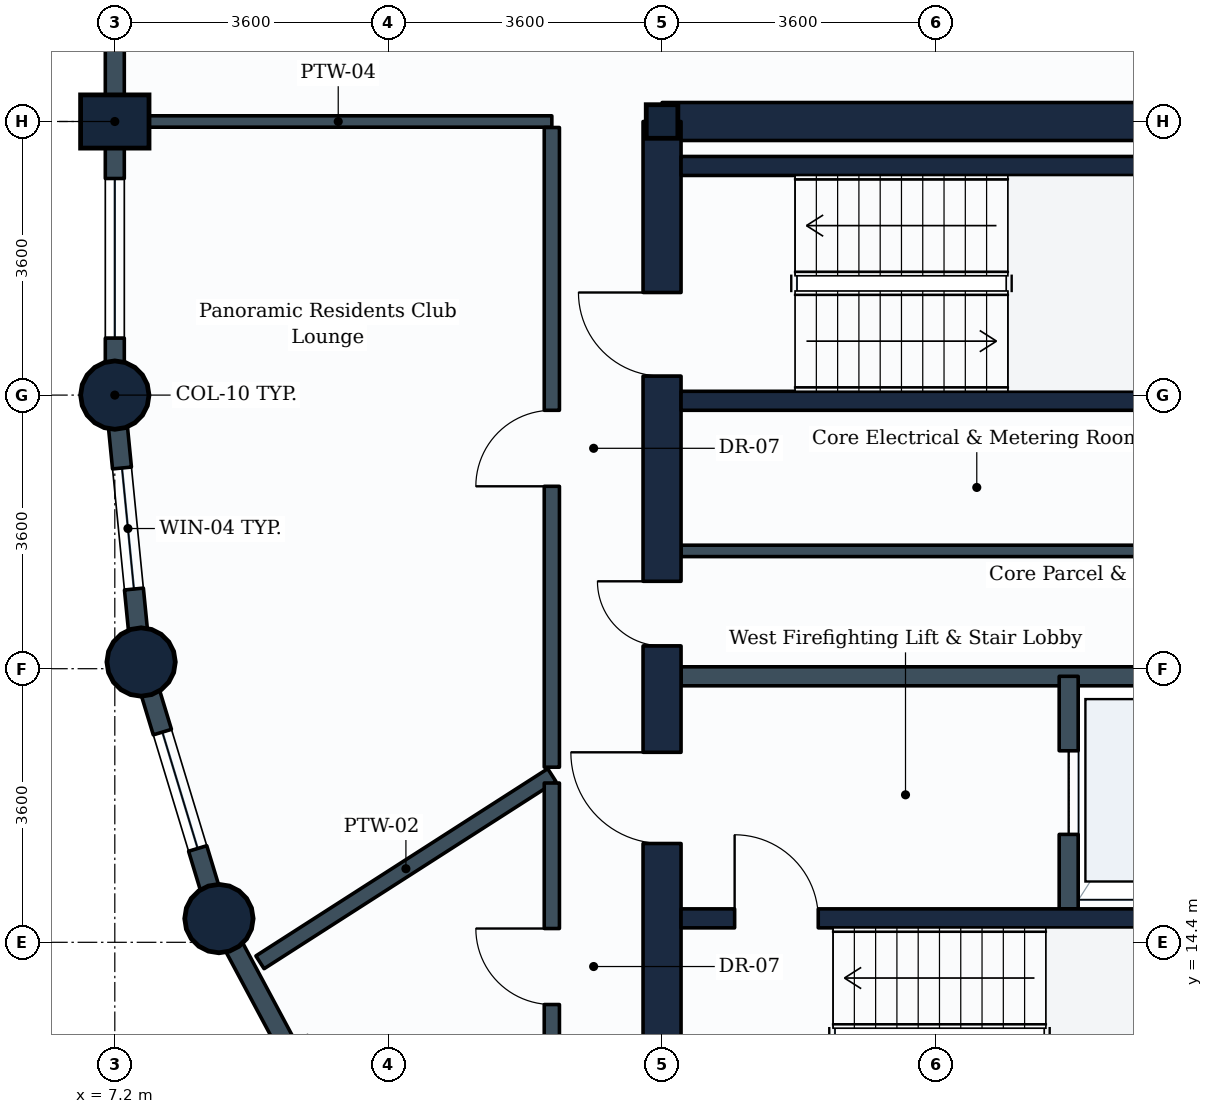
"""IFC4 building model, lengths in metres.
Left out: names, types, materials, properties, quantities, classifications, styles, units other than length and angle.
Written with IfcOpenShell. Run it as: python <this file> out.ifc"""

import sys

from ifc_helpers import new_model, si_unit, direction, frame, frame_2d, origin, origin_2d, place, context, subcontext, project, spatial, rectangle, circle, i_section, extrude, element, fill, save


model = new_model("IFC4")
c1 = context("Model", 3, precision=1e-05, world=origin(), true_north=direction((0.0, 1.0)))
c2 = subcontext(c1, "Body", "Model", "MODEL_VIEW")
j1 = project(units=[si_unit("LENGTHUNIT", "METRE"), si_unit("PLANEANGLEUNIT", "RADIAN")], contexts=[c1])
p1 = place(None, origin())
s1 = spatial("IfcSite", under=j1, at=p1, CompositionType="ELEMENT")
p2 = place(p1, origin())
s2 = spatial("IfcBuilding", under=s1, at=p2, CompositionType="ELEMENT")
p3 = place(p2, frame((0.0, 0.0, 186.2)))
s3 = spatial("IfcBuildingStorey", under=s2, at=p3, CompositionType="ELEMENT", Elevation=186.2)
p4 = place(p3, frame((7.2, 21.6, 0.0), z_axis=(0.0, 0.0, 1.0), x_axis=(1.0, 0.0, 0.0)))
e1 = element("IfcColumn", 1, at=p4, inside=s3, PredefinedType="COLUMN", context=c2, shape_type="SweptSolid", body=[
    extrude(circle(Radius=0.45, at=origin_2d()), origin(), (0.0, 0.0, 1.0), 3.8),
])
p5 = place(p3, frame((7.2, 25.2, 0.0), z_axis=(0.0, 0.0, 1.0), x_axis=(0.0, 1.0, 0.0)))
e2 = element("IfcColumn", 2, at=p5, inside=s3, PredefinedType="COLUMN", context=c2, shape_type="SweptSolid", body=[
    extrude(rectangle(XDim=0.7, YDim=0.9, at=origin_2d()), origin(), (0.0, 0.0, 1.0), 3.8),
])
for number, where, z_axis, x_axis in (
    (3, (7.546, 18.088, 0.0), (0.0, 0.0, 1.0), (1.0, 0.0, 0.0)),
    (4, (8.57, 14.712, 0.0), (0.0, 0.0, 1.0), (1.0, 0.0, 0.0)),
):
    element("IfcColumn", number, at=place(p3, frame(where, z_axis=z_axis, x_axis=x_axis)), inside=s3, PredefinedType="COLUMN", context=c2, shape_type="SweptSolid", body=[
        extrude(circle(Radius=0.45, at=origin_2d()), origin(), (0.0, 0.0, 1.0), 3.8),
    ])
p6 = place(p3, frame((14.4, 25.2, 0.0), z_axis=(0.0, 0.0, 1.0), x_axis=(1.0, 0.0, 0.0)))
e5 = element("IfcColumn", 5, at=p6, inside=s3, PredefinedType="COLUMN", context=c2, shape_type="SweptSolid", body=[
    extrude(i_section(OverallWidth=0.416, OverallDepth=0.442, WebThickness=0.025, FlangeThickness=0.041, FilletRadius=0.015, at=origin_2d()), origin(), (0.0, 0.0, 1.0), 3.8),
])
p7 = place(p3, frame((7.2, 25.2, 0.0), z_axis=(0.0, 0.0, 1.0), x_axis=(0.0, 1.0, 0.0)))
e6 = element("IfcWall", 6, at=p7, inside=s3, PredefinedType="STANDARD", context=c2, shape_type="SweptSolid", body=[
    extrude(rectangle(XDim=3.6, YDim=0.25, at=frame_2d((1.8, 0.0))), origin(), (0.0, 0.0, 1.0), 2.93),
])
p8 = place(p3, frame((7.2, 21.6, 0.0), z_axis=(0.0, 0.0, 1.0), x_axis=(0.0, 1.0, 0.0)))
e7 = element("IfcWall", 7, at=p8, inside=s3, PredefinedType="STANDARD", context=c2, shape_type="SweptSolid", body=[
    extrude(rectangle(XDim=3.6, YDim=0.25, at=frame_2d((1.8, 0.0))), origin(), (0.0, 0.0, 1.0), 2.93),
])
p9 = place(p8, frame((0.75, 0.0, 0.85)))
e8 = element("IfcOpeningElement", 8, at=p9, cuts=e7, PredefinedType="OPENING", context=c2, shape_type="SweptSolid", body=[
    extrude(rectangle(XDim=2.1, YDim=1.35, at=frame_2d((1.05, 0.675))), frame((0.0, 0.135, 0.0), z_axis=(0.0, -1.0, 0.0), x_axis=(1.0, 0.0, 0.0)), (0.0, 0.0, 1.0), 0.27),
])
p10 = place(p3, frame((7.546, 18.088, 0.0), z_axis=(0.0, 0.0, 1.0), x_axis=(-0.09802417461, 0.995184033831, 0.0)))
e9 = element("IfcWall", 9, at=p10, inside=s3, PredefinedType="STANDARD", context=c2, shape_type="SweptSolid", body=[
    extrude(rectangle(XDim=3.529, YDim=0.25, at=frame_2d((1.765, 0.0))), origin(), (0.0, 0.0, 1.0), 2.93),
])
p11 = place(p10, frame((0.965, 0.0, 0.85)))
e10 = element("IfcOpeningElement", 10, at=p11, cuts=e9, PredefinedType="OPENING", context=c2, shape_type="SweptSolid", body=[
    extrude(rectangle(XDim=1.6, YDim=1.35, at=frame_2d((0.8, 0.675))), frame((0.0, 0.135, 0.0), z_axis=(0.0, -1.0, 0.0), x_axis=(1.0, 0.0, 0.0)), (0.0, 0.0, 1.0), 0.27),
])
p12 = place(p3, frame((8.57, 14.712, 0.0), z_axis=(0.0, 0.0, 1.0), x_axis=(-0.290305086481, 0.956934144423, 0.0)))
e11 = element("IfcWall", 11, at=p12, inside=s3, PredefinedType="STANDARD", context=c2, shape_type="SweptSolid", body=[
    extrude(rectangle(XDim=3.528, YDim=0.25, at=frame_2d((1.764, 0.0))), origin(), (0.0, 0.0, 1.0), 2.93),
])
p13 = place(p12, frame((0.964, 0.0, 0.85)))
e12 = element("IfcOpeningElement", 12, at=p13, cuts=e11, PredefinedType="OPENING", context=c2, shape_type="SweptSolid", body=[
    extrude(rectangle(XDim=1.6, YDim=1.35, at=frame_2d((0.8, 0.675))), frame((0.0, 0.135, 0.0), z_axis=(0.0, -1.0, 0.0), x_axis=(1.0, 0.0, 0.0)), (0.0, 0.0, 1.0), 0.27),
])
p14 = place(p3, frame((10.234, 11.6, 0.0), z_axis=(0.0, 0.0, 1.0), x_axis=(-0.47151087309, 0.881860247748, 0.0)))
e13 = element("IfcWall", 13, at=p14, inside=s3, PredefinedType="STANDARD", context=c2, shape_type="SweptSolid", body=[
    extrude(rectangle(XDim=3.529, YDim=0.25, at=frame_2d((1.764, 0.0))), origin(), (0.0, 0.0, 1.0), 2.93),
])
p15 = place(p3, frame((14.4, 25.2, 0.0), z_axis=(0.0, 0.0, 1.0), x_axis=(1.0, 0.0, 0.0)))
e14 = element("IfcWall", 14, at=p15, inside=s3, PredefinedType="SHEAR", context=c2, shape_type="SweptSolid", body=[
    extrude(rectangle(XDim=10.8, YDim=0.5, at=frame_2d((5.4, 0.0))), origin(), (0.0, 0.0, 1.0), 3.55),
])
p16 = place(p3, frame((14.4, 10.8, 0.0), z_axis=(0.0, 0.0, 1.0), x_axis=(0.0, 1.0, 0.0)))
e15 = element("IfcWall", 15, at=p16, inside=s3, PredefinedType="SHEAR", context=c2, shape_type="SweptSolid", body=[
    extrude(rectangle(XDim=14.4, YDim=0.5, at=frame_2d((7.2, 0.0))), origin(), (0.0, 0.0, 1.0), 3.55),
])
p17 = place(p16, frame((11.05, 0.0, 0.0)))
e16 = element("IfcOpeningElement", 16, at=p17, cuts=e15, PredefinedType="OPENING", context=c2, shape_type="SweptSolid", body=[
    extrude(rectangle(XDim=1.1, YDim=2.1, at=frame_2d((0.55, 1.05))), frame((0.0, 0.26, 0.0), z_axis=(0.0, -1.0, 0.0), x_axis=(1.0, 0.0, 0.0)), (0.0, 0.0, 1.0), 0.52),
])
p18 = place(p16, frame((4.9, 0.0, 0.0)))
e17 = element("IfcOpeningElement", 17, at=p18, cuts=e15, PredefinedType="OPENING", context=c2, shape_type="SweptSolid", body=[
    extrude(rectangle(XDim=1.2, YDim=2.1, at=frame_2d((0.6, 1.05))), frame((0.0, 0.26, 0.0), z_axis=(0.0, -1.0, 0.0), x_axis=(1.0, 0.0, 0.0)), (0.0, 0.0, 1.0), 0.52),
])
p19 = place(p16, frame((7.5, 0.0, 0.0)))
e18 = element("IfcOpeningElement", 18, at=p19, cuts=e15, PredefinedType="OPENING", context=c2, shape_type="SweptSolid", body=[
    extrude(rectangle(XDim=0.85, YDim=2.1, at=frame_2d((0.425, 1.05))), frame((0.0, 0.26, 0.0), z_axis=(0.0, -1.0, 0.0), x_axis=(1.0, 0.0, 0.0)), (0.0, 0.0, 1.0), 0.52),
])
p20 = place(p3, frame((14.65, 14.715, 0.0), z_axis=(0.0, 0.0, 1.0), x_axis=(1.0, 0.0, 0.0)))
e19 = element("IfcWall", 19, at=p20, inside=s3, PredefinedType="SHEAR", context=c2, shape_type="SweptSolid", body=[
    extrude(rectangle(XDim=8.7, YDim=0.25, at=frame_2d((4.35, 0.0))), origin(), (0.0, 0.0, 1.0), 3.55),
])
p21 = place(p20, frame((0.705, 0.0, 0.0)))
e20 = element("IfcOpeningElement", 20, at=p21, cuts=e19, PredefinedType="OPENING", context=c2, shape_type="SweptSolid", body=[
    extrude(rectangle(XDim=1.1, YDim=2.1, at=frame_2d((0.55, 1.05))), frame((0.0, 0.135, 0.0), z_axis=(0.0, -1.0, 0.0), x_axis=(1.0, 0.0, 0.0)), (0.0, 0.0, 1.0), 0.27),
])
for number, where, z_axis, x_axis in (
    (21, (14.65, 21.525, 0.0), (0.0, 0.0, 1.0), (1.0, 0.0, 0.0)),
    (22, (14.65, 24.615, 0.0), (0.0, 0.0, 1.0), (1.0, 0.0, 0.0)),
):
    element("IfcWall", number, at=place(p3, frame(where, z_axis=z_axis, x_axis=x_axis)), inside=s3, PredefinedType="SHEAR", context=c2, shape_type="SweptSolid", body=[
        extrude(rectangle(XDim=8.25, YDim=0.25, at=frame_2d((4.125, 0.0))), origin(), (0.0, 0.0, 1.0), 3.55),
    ])
p22 = place(p3, frame((14.65, 17.9, 0.0), z_axis=(0.0, 0.0, 1.0), x_axis=(1.0, 0.0, 0.0)))
e23 = element("IfcWall", 23, at=p22, inside=s3, PredefinedType="PARTITIONING", context=c2, shape_type="SweptSolid", body=[
    extrude(rectangle(XDim=7.15, YDim=0.25, at=frame_2d((3.575, 0.0))), origin(), (0.0, 0.0, 1.0), 3.535),
])
p23 = place(p3, frame((19.75, 14.84, 0.0), z_axis=(0.0, 0.0, 1.0), x_axis=(0.0, 1.0, 0.0)))
e24 = element("IfcWall", 24, at=p23, inside=s3, PredefinedType="PARTITIONING", context=c2, shape_type="SweptSolid", body=[
    extrude(rectangle(XDim=3.06, YDim=0.25, at=frame_2d((1.53, 0.0))), origin(), (0.0, 0.0, 1.0), 3.535),
])
p24 = place(p23, frame((0.98, 0.0, 0.0)))
e25 = element("IfcOpeningElement", 25, at=p24, cuts=e24, PredefinedType="OPENING", context=c2, shape_type="SweptSolid", body=[
    extrude(rectangle(XDim=1.1, YDim=2.1, at=frame_2d((0.55, 1.05))), frame((0.0, 0.135, 0.0), z_axis=(0.0, -1.0, 0.0), x_axis=(1.0, 0.0, 0.0)), (0.0, 0.0, 1.0), 0.27),
])
p25 = place(p3, frame((14.65, 19.55, 0.0), z_axis=(0.0, 0.0, 1.0), x_axis=(1.0, 0.0, 0.0)))
e26 = element("IfcWall", 26, at=p25, inside=s3, PredefinedType="PARTITIONING", context=c2, shape_type="SweptSolid", body=[
    extrude(rectangle(XDim=8.0, YDim=0.15, at=frame_2d((4.0, 0.0))), origin(), (0.0, 0.0, 1.0), 3.535),
])
p26 = place(p3, frame((7.329, 25.2, 0.0), z_axis=(0.0, 0.0, 1.0), x_axis=(1.0, 0.0, 0.0)))
e27 = element("IfcWall", 27, at=p26, inside=s3, PredefinedType="PARTITIONING", context=c2, shape_type="SweptSolid", body=[
    extrude(rectangle(XDim=5.621, YDim=0.15, at=frame_2d((2.811, 0.0))), origin(), (0.0, 0.0, 1.0), 3.535),
])
p27 = place(p3, frame((12.95, 16.6, 0.0), z_axis=(0.0, 0.0, 1.0), x_axis=(-0.841685822078, -0.539967570242, 0.0)))
e28 = element("IfcWall", 28, at=p27, inside=s3, PredefinedType="PARTITIONING", context=c2, shape_type="SweptSolid", body=[
    extrude(rectangle(XDim=4.562, YDim=0.2, at=frame_2d((2.281, 0.0))), origin(), (0.0, 0.0, 1.0), 2.93),
])
p28 = place(p3, frame((12.95, 16.704, 0.0), z_axis=(0.0, 0.0, 1.0), x_axis=(0.0, 1.0, 0.0)))
e29 = element("IfcWall", 29, at=p28, inside=s3, PredefinedType="PARTITIONING", context=c2, shape_type="SweptSolid", body=[
    extrude(rectangle(XDim=8.417, YDim=0.2, at=frame_2d((4.208, 0.0))), origin(), (0.0, 0.0, 1.0), 3.22),
])
p29 = place(p28, frame((3.696, 0.0, 0.0)))
e30 = element("IfcOpeningElement", 30, at=p29, cuts=e29, PredefinedType="OPENING", context=c2, shape_type="SweptSolid", body=[
    extrude(rectangle(XDim=1.0, YDim=2.1, at=frame_2d((0.5, 1.05))), frame((0.0, 0.11, 0.0), z_axis=(0.0, -1.0, 0.0), x_axis=(1.0, 0.0, 0.0)), (0.0, 0.0, 1.0), 0.22),
])
p30 = place(p3, frame((12.95, 9.623, 0.0), z_axis=(0.0, 0.0, 1.0), x_axis=(0.0, 1.0, 0.0)))
e31 = element("IfcWall", 31, at=p30, inside=s3, PredefinedType="PARTITIONING", context=c2, shape_type="SweptSolid", body=[
    extrude(rectangle(XDim=6.873, YDim=0.2, at=frame_2d((3.437, 0.0))), origin(), (0.0, 0.0, 1.0), 3.17),
])
p31 = place(p30, frame((3.958, 0.0, 0.0)))
e32 = element("IfcOpeningElement", 32, at=p31, cuts=e31, PredefinedType="OPENING", context=c2, shape_type="SweptSolid", body=[
    extrude(rectangle(XDim=1.0, YDim=2.1, at=frame_2d((0.5, 1.05))), frame((0.0, 0.11, 0.0), z_axis=(0.0, -1.0, 0.0), x_axis=(1.0, 0.0, 0.0)), (0.0, 0.0, 1.0), 0.22),
])
p32 = place(p9, origin())
e33 = element("IfcWindow", 33, at=p32, inside=s3, PartitioningType="SINGLE_PANEL", PredefinedType="WINDOW", context=c2, shape_type="SweptSolid", body=[
    extrude(rectangle(XDim=2.1, YDim=1.35, at=frame_2d((1.05, 0.675))), frame((0.0, 0.03, 0.0), z_axis=(0.0, -1.0, 0.0), x_axis=(1.0, 0.0, 0.0)), (0.0, 0.0, 1.0), 0.06),
])
fill(e8, e33)
p33 = place(p11, origin())
e34 = element("IfcWindow", 34, at=p33, inside=s3, PartitioningType="SINGLE_PANEL", PredefinedType="WINDOW", context=c2, shape_type="SweptSolid", body=[
    extrude(rectangle(XDim=1.6, YDim=1.35, at=frame_2d((0.8, 0.675))), frame((0.0, 0.03, 0.0), z_axis=(0.0, -1.0, 0.0), x_axis=(1.0, 0.0, 0.0)), (0.0, 0.0, 1.0), 0.06),
])
fill(e10, e34)
p34 = place(p13, origin())
e35 = element("IfcWindow", 35, at=p34, inside=s3, PartitioningType="SINGLE_PANEL", PredefinedType="WINDOW", context=c2, shape_type="SweptSolid", body=[
    extrude(rectangle(XDim=1.6, YDim=1.35, at=frame_2d((0.8, 0.675))), frame((0.0, 0.03, 0.0), z_axis=(0.0, -1.0, 0.0), x_axis=(1.0, 0.0, 0.0)), (0.0, 0.0, 1.0), 0.06),
])
fill(e12, e35)
p35 = place(p21, origin())
e36 = element("IfcDoor", 36, at=p35, inside=s3, OperationType="SINGLE_SWING_LEFT", PredefinedType="DOOR", context=c2, shape_type="SweptSolid", body=[
    extrude(rectangle(XDim=1.1, YDim=2.1, at=frame_2d((0.55, 1.05))), frame((0.0, 0.025, 0.0), z_axis=(0.0, -1.0, 0.0), x_axis=(1.0, 0.0, 0.0)), (0.0, 0.0, 1.0), 0.05),
])
fill(e20, e36)
p36 = place(p17, origin())
e37 = element("IfcDoor", 37, at=p36, inside=s3, OperationType="SINGLE_SWING_RIGHT", PredefinedType="DOOR", context=c2, shape_type="SweptSolid", body=[
    extrude(rectangle(XDim=1.1, YDim=2.1, at=frame_2d((0.55, 1.05))), frame((0.0, 0.025, 0.0), z_axis=(0.0, -1.0, 0.0), x_axis=(1.0, 0.0, 0.0)), (0.0, 0.0, 1.0), 0.05),
])
fill(e16, e37)
p37 = place(p24, origin())
e38 = element("IfcDoor", 38, at=p37, inside=s3, OperationType="SLIDING_TO_LEFT", PredefinedType="DOOR", context=c2, shape_type="SweptSolid", body=[
    extrude(rectangle(XDim=1.1, YDim=2.1, at=frame_2d((0.55, 1.05))), frame((0.0, 0.025, 0.0), z_axis=(0.0, -1.0, 0.0), x_axis=(1.0, 0.0, 0.0)), (0.0, 0.0, 1.0), 0.05),
])
fill(e25, e38)
p38 = place(p18, origin())
e39 = element("IfcDoor", 39, at=p38, inside=s3, OperationType="SINGLE_SWING_RIGHT", PredefinedType="DOOR", context=c2, shape_type="SweptSolid", body=[
    extrude(rectangle(XDim=1.2, YDim=2.1, at=frame_2d((0.6, 1.05))), frame((0.0, 0.025, 0.0), z_axis=(0.0, -1.0, 0.0), x_axis=(1.0, 0.0, 0.0)), (0.0, 0.0, 1.0), 0.05),
])
fill(e17, e39)
p39 = place(p19, origin())
e40 = element("IfcDoor", 40, at=p39, inside=s3, OperationType="SINGLE_SWING_RIGHT", PredefinedType="DOOR", context=c2, shape_type="SweptSolid", body=[
    extrude(rectangle(XDim=0.85, YDim=2.1, at=frame_2d((0.425, 1.05))), frame((0.0, 0.025, 0.0), z_axis=(0.0, -1.0, 0.0), x_axis=(1.0, 0.0, 0.0)), (0.0, 0.0, 1.0), 0.05),
])
fill(e18, e40)
p40 = place(p29, origin())
e41 = element("IfcDoor", 41, at=p40, inside=s3, OperationType="SINGLE_SWING_LEFT", PredefinedType="DOOR", context=c2, shape_type="SweptSolid", body=[
    extrude(rectangle(XDim=1.0, YDim=2.1, at=frame_2d((0.5, 1.05))), frame((0.0, 0.025, 0.0), z_axis=(0.0, -1.0, 0.0), x_axis=(1.0, 0.0, 0.0)), (0.0, 0.0, 1.0), 0.05),
])
fill(e30, e41)
p41 = place(p31, origin())
e42 = element("IfcDoor", 42, at=p41, inside=s3, OperationType="SINGLE_SWING_RIGHT", PredefinedType="DOOR", context=c2, shape_type="SweptSolid", body=[
    extrude(rectangle(XDim=1.0, YDim=2.1, at=frame_2d((0.5, 1.05))), frame((0.0, 0.025, 0.0), z_axis=(0.0, -1.0, 0.0), x_axis=(1.0, 0.0, 0.0)), (0.0, 0.0, 1.0), 0.05),
])
fill(e32, e42)
save(model, sys.argv[1])
